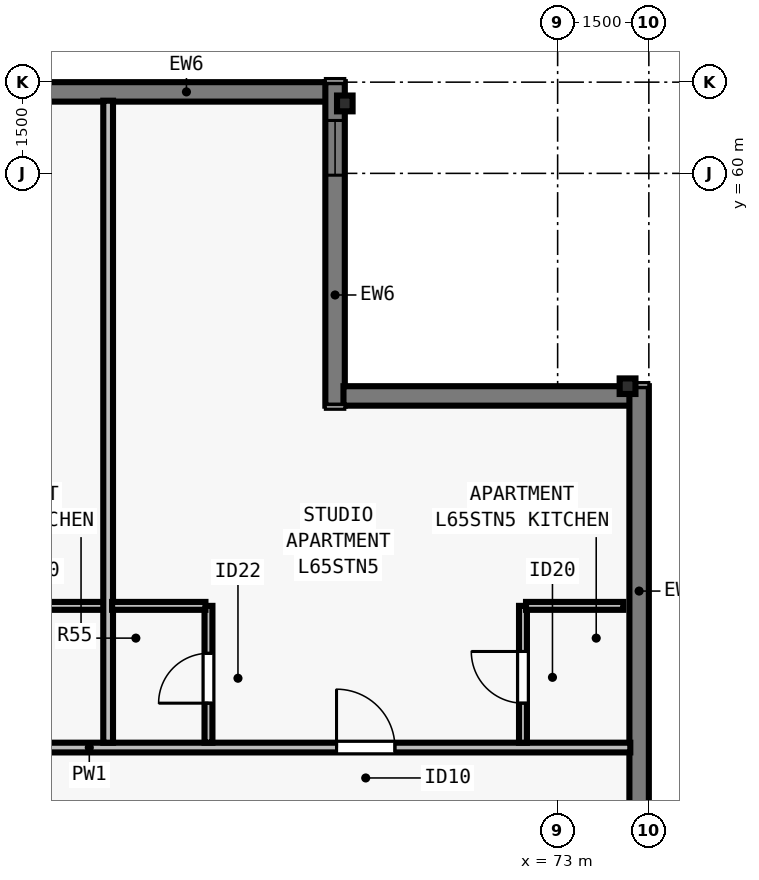
"""IFC4 building model, lengths in metres.
Left out: names, types, materials, properties, quantities, classifications, styles, units other than length and angle.
Written with IfcOpenShell. Run it as: python <this file> out.ifc"""

import sys

from ifc_helpers import new_model, si_unit, direction, frame, frame_2d, origin, origin_2d, place, context, subcontext, project, spatial, rectangle, i_section, extrude, element, fill, save


model = new_model("IFC4")
c1 = context("Model", 3, precision=1e-05, world=origin(), true_north=direction((0.0, 1.0)))
c2 = subcontext(c1, "Body", "Model", "MODEL_VIEW")
j1 = project(units=[si_unit("LENGTHUNIT", "METRE"), si_unit("PLANEANGLEUNIT", "RADIAN")], contexts=[c1])
p1 = place(None, origin())
s1 = spatial("IfcSite", under=j1, at=p1, CompositionType="ELEMENT")
p2 = place(p1, origin())
s2 = spatial("IfcBuilding", under=s1, at=p2, CompositionType="ELEMENT")
p3 = place(p2, frame((0.0, 0.0, 237.5)))
s3 = spatial("IfcBuildingStorey", under=s2, at=p3, CompositionType="ELEMENT", Elevation=237.5)
for number, where, z_axis, x_axis in (
    (1, (74.15, 56.5, 0.0), (0.0, 0.0, 1.0), (0.0, 1.0, 0.0)),
    (2, (69.5, 61.15, 0.0), (0.0, 0.0, 1.0), (1.0, 0.0, 0.0)),
):
    element("IfcColumn", number, at=place(p3, frame(where, z_axis=z_axis, x_axis=x_axis)), inside=s3, PredefinedType="COLUMN", context=c2, shape_type="SweptSolid", body=[
        extrude(i_section(OverallWidth=0.256, OverallDepth=0.26, WebThickness=0.01, FlangeThickness=0.017, FilletRadius=0.013, at=origin_2d()), origin(), (0.0, 0.0, 1.0), 3.5),
    ])
p4 = place(p3, frame((34.5, 61.34, 0.0), z_axis=(0.0, 0.0, 1.0), x_axis=(1.0, 0.0, 0.0)))
e3 = element("IfcWall", 3, at=p4, inside=s3, PredefinedType="SOLIDWALL", context=c2, shape_type="SweptSolid", body=[
    extrude(rectangle(XDim=34.702, YDim=0.32, at=frame_2d((17.351, 0.0))), origin(), (0.0, 0.0, 1.0), 3.29),
])
p5 = place(p4, frame((4.613, 0.0, 0.8)))
e4 = element("IfcOpeningElement", 4, at=p5, cuts=e3, PredefinedType="OPENING", context=c2, shape_type="SweptSolid", body=[
    extrude(rectangle(XDim=1.85, YDim=1.678, at=frame_2d((0.925, 0.839))), frame((0.0, 0.17, 0.0), z_axis=(0.0, -1.0, 0.0), x_axis=(1.0, 0.0, 0.0)), (0.0, 0.0, 1.0), 0.34),
])
p6 = place(p4, frame((8.138, 0.0, 0.8)))
e5 = element("IfcOpeningElement", 5, at=p6, cuts=e3, PredefinedType="OPENING", context=c2, shape_type="SweptSolid", body=[
    extrude(rectangle(XDim=1.55, YDim=1.678, at=frame_2d((0.775, 0.839))), frame((0.0, 0.17, 0.0), z_axis=(0.0, -1.0, 0.0), x_axis=(1.0, 0.0, 0.0)), (0.0, 0.0, 1.0), 0.34),
])
p7 = place(p4, frame((10.113, 0.0, 0.8)))
e6 = element("IfcOpeningElement", 6, at=p7, cuts=e3, PredefinedType="OPENING", context=c2, shape_type="SweptSolid", body=[
    extrude(rectangle(XDim=1.85, YDim=1.678, at=frame_2d((0.925, 0.839))), frame((0.0, 0.17, 0.0), z_axis=(0.0, -1.0, 0.0), x_axis=(1.0, 0.0, 0.0)), (0.0, 0.0, 1.0), 0.34),
])
p8 = place(p4, frame((14.888, 0.0, 0.8)))
e7 = element("IfcOpeningElement", 7, at=p8, cuts=e3, PredefinedType="OPENING", context=c2, shape_type="SweptSolid", body=[
    extrude(rectangle(XDim=1.55, YDim=1.678, at=frame_2d((0.775, 0.839))), frame((0.0, 0.17, 0.0), z_axis=(0.0, -1.0, 0.0), x_axis=(1.0, 0.0, 0.0)), (0.0, 0.0, 1.0), 0.34),
])
p9 = place(p4, frame((18.114, 0.0, 0.8)))
e8 = element("IfcOpeningElement", 8, at=p9, cuts=e3, PredefinedType="OPENING", context=c2, shape_type="SweptSolid", body=[
    extrude(rectangle(XDim=1.85, YDim=1.678, at=frame_2d((0.925, 0.839))), frame((0.0, 0.17, 0.0), z_axis=(0.0, -1.0, 0.0), x_axis=(1.0, 0.0, 0.0)), (0.0, 0.0, 1.0), 0.34),
])
p10 = place(p4, frame((24.864, 0.0, 0.8)))
e9 = element("IfcOpeningElement", 9, at=p10, cuts=e3, PredefinedType="OPENING", context=c2, shape_type="SweptSolid", body=[
    extrude(rectangle(XDim=1.85, YDim=1.678, at=frame_2d((0.925, 0.839))), frame((0.0, 0.17, 0.0), z_axis=(0.0, -1.0, 0.0), x_axis=(1.0, 0.0, 0.0)), (0.0, 0.0, 1.0), 0.34),
])
p11 = place(p4, frame((28.389, 0.0, 0.8)))
e10 = element("IfcOpeningElement", 10, at=p11, cuts=e3, PredefinedType="OPENING", context=c2, shape_type="SweptSolid", body=[
    extrude(rectangle(XDim=1.55, YDim=1.678, at=frame_2d((0.775, 0.839))), frame((0.0, 0.17, 0.0), z_axis=(0.0, -1.0, 0.0), x_axis=(1.0, 0.0, 0.0)), (0.0, 0.0, 1.0), 0.34),
])
p12 = place(p3, frame((69.34, 61.5, 0.0), z_axis=(0.0, 0.0, 1.0), x_axis=(0.0, -1.0, 0.0)))
e11 = element("IfcWall", 11, at=p12, inside=s3, PredefinedType="SOLIDWALL", context=c2, shape_type="SweptSolid", body=[
    extrude(rectangle(XDim=5.32, YDim=0.32, at=frame_2d((2.66, 0.0))), origin(), (0.0, 0.0, 1.0), 3.29),
])
p13 = place(p12, frame((0.63, 0.0, 0.8)))
e12 = element("IfcOpeningElement", 12, at=p13, cuts=e11, PredefinedType="OPENING", context=c2, shape_type="SweptSolid", body=[
    extrude(rectangle(XDim=0.9, YDim=1.678, at=frame_2d((0.45, 0.839))), frame((0.0, 0.17, 0.0), z_axis=(0.0, -1.0, 0.0), x_axis=(1.0, 0.0, 0.0)), (0.0, 0.0, 1.0), 0.34),
])
p14 = place(p3, frame((69.478, 56.34, 0.0), z_axis=(0.0, 0.0, 1.0), x_axis=(1.0, 0.0, 0.0)))
e13 = element("IfcWall", 13, at=p14, inside=s3, PredefinedType="SOLIDWALL", context=c2, shape_type="SweptSolid", body=[
    extrude(rectangle(XDim=4.724, YDim=0.32, at=frame_2d((2.362, 0.0))), origin(), (0.0, 0.0, 1.0), 3.29),
])
p15 = place(p3, frame((74.34, 56.5, 0.0), z_axis=(0.0, 0.0, 1.0), x_axis=(0.0, -1.0, 0.0)))
e14 = element("IfcWall", 14, at=p15, inside=s3, PredefinedType="SOLIDWALL", context=c2, shape_type="SweptSolid", body=[
    extrude(rectangle(XDim=34.702, YDim=0.32, at=frame_2d((17.351, 0.0))), origin(), (0.0, 0.0, 1.0), 3.29),
])
p16 = place(p15, frame((6.888, 0.0, 0.8)))
e15 = element("IfcOpeningElement", 15, at=p16, cuts=e14, PredefinedType="OPENING", context=c2, shape_type="SweptSolid", body=[
    extrude(rectangle(XDim=1.55, YDim=1.678, at=frame_2d((0.775, 0.839))), frame((0.0, 0.17, 0.0), z_axis=(0.0, -1.0, 0.0), x_axis=(1.0, 0.0, 0.0)), (0.0, 0.0, 1.0), 0.34),
])
p17 = place(p15, frame((10.113, 0.0, 0.8)))
e16 = element("IfcOpeningElement", 16, at=p17, cuts=e14, PredefinedType="OPENING", context=c2, shape_type="SweptSolid", body=[
    extrude(rectangle(XDim=1.85, YDim=1.678, at=frame_2d((0.925, 0.839))), frame((0.0, 0.17, 0.0), z_axis=(0.0, -1.0, 0.0), x_axis=(1.0, 0.0, 0.0)), (0.0, 0.0, 1.0), 0.34),
])
p18 = place(p15, frame((14.888, 0.0, 0.8)))
e17 = element("IfcOpeningElement", 17, at=p18, cuts=e14, PredefinedType="OPENING", context=c2, shape_type="SweptSolid", body=[
    extrude(rectangle(XDim=1.55, YDim=1.678, at=frame_2d((0.775, 0.839))), frame((0.0, 0.17, 0.0), z_axis=(0.0, -1.0, 0.0), x_axis=(1.0, 0.0, 0.0)), (0.0, 0.0, 1.0), 0.34),
])
p19 = place(p15, frame((18.114, 0.0, 0.8)))
e18 = element("IfcOpeningElement", 18, at=p19, cuts=e14, PredefinedType="OPENING", context=c2, shape_type="SweptSolid", body=[
    extrude(rectangle(XDim=1.85, YDim=1.678, at=frame_2d((0.925, 0.839))), frame((0.0, 0.17, 0.0), z_axis=(0.0, -1.0, 0.0), x_axis=(1.0, 0.0, 0.0)), (0.0, 0.0, 1.0), 0.34),
])
p20 = place(p15, frame((23.614, 0.0, 0.8)))
e19 = element("IfcOpeningElement", 19, at=p20, cuts=e14, PredefinedType="OPENING", context=c2, shape_type="SweptSolid", body=[
    extrude(rectangle(XDim=1.85, YDim=1.678, at=frame_2d((0.925, 0.839))), frame((0.0, 0.17, 0.0), z_axis=(0.0, -1.0, 0.0), x_axis=(1.0, 0.0, 0.0)), (0.0, 0.0, 1.0), 0.34),
])
p21 = place(p15, frame((27.139, 0.0, 0.8)))
e20 = element("IfcOpeningElement", 20, at=p21, cuts=e14, PredefinedType="OPENING", context=c2, shape_type="SweptSolid", body=[
    extrude(rectangle(XDim=1.55, YDim=1.678, at=frame_2d((0.775, 0.839))), frame((0.0, 0.17, 0.0), z_axis=(0.0, -1.0, 0.0), x_axis=(1.0, 0.0, 0.0)), (0.0, 0.0, 1.0), 0.34),
])
p22 = place(p3, frame((29.805, 50.558, 0.0), z_axis=(0.0, 0.0, 1.0), x_axis=(1.0, 0.0, 0.0)))
e21 = element("IfcWall", 21, at=p22, inside=s3, PredefinedType="PARTITIONING", context=c2, shape_type="SweptSolid", body=[
    extrude(rectangle(XDim=44.39, YDim=0.16, at=frame_2d((22.195, 0.0))), origin(), (0.0, 0.0, 1.0), 2.958),
])
p23 = place(p22, frame((3.791, 0.0, 0.0)))
e22 = element("IfcOpeningElement", 22, at=p23, cuts=e21, PredefinedType="OPENING", context=c2, shape_type="SweptSolid", body=[
    extrude(rectangle(XDim=0.96, YDim=2.18, at=frame_2d((0.48, 1.09))), frame((0.0, 0.09, 0.0), z_axis=(0.0, -1.0, 0.0), x_axis=(1.0, 0.0, 0.0)), (0.0, 0.0, 1.0), 0.18),
])
p24 = place(p22, frame((12.803, 0.0, 0.0)))
e23 = element("IfcOpeningElement", 23, at=p24, cuts=e21, PredefinedType="OPENING", context=c2, shape_type="SweptSolid", body=[
    extrude(rectangle(XDim=0.96, YDim=2.18, at=frame_2d((0.48, 1.09))), frame((0.0, 0.09, 0.0), z_axis=(0.0, -1.0, 0.0), x_axis=(1.0, 0.0, 0.0)), (0.0, 0.0, 1.0), 0.18),
])
p25 = place(p22, frame((21.635, 0.0, 0.0)))
e24 = element("IfcOpeningElement", 24, at=p25, cuts=e21, PredefinedType="OPENING", context=c2, shape_type="SweptSolid", body=[
    extrude(rectangle(XDim=0.96, YDim=2.18, at=frame_2d((0.48, 1.09))), frame((0.0, 0.09, 0.0), z_axis=(0.0, -1.0, 0.0), x_axis=(1.0, 0.0, 0.0)), (0.0, 0.0, 1.0), 0.18),
])
p26 = place(p22, frame((30.467, 0.0, 0.0)))
e25 = element("IfcOpeningElement", 25, at=p26, cuts=e21, PredefinedType="OPENING", context=c2, shape_type="SweptSolid", body=[
    extrude(rectangle(XDim=0.96, YDim=2.18, at=frame_2d((0.48, 1.09))), frame((0.0, 0.09, 0.0), z_axis=(0.0, -1.0, 0.0), x_axis=(1.0, 0.0, 0.0)), (0.0, 0.0, 1.0), 0.18),
])
p27 = place(p22, frame((39.559, 0.0, 0.0)))
e26 = element("IfcOpeningElement", 26, at=p27, cuts=e21, PredefinedType="OPENING", context=c2, shape_type="SweptSolid", body=[
    extrude(rectangle(XDim=0.96, YDim=2.18, at=frame_2d((0.48, 1.09))), frame((0.0, 0.09, 0.0), z_axis=(0.0, -1.0, 0.0), x_axis=(1.0, 0.0, 0.0)), (0.0, 0.0, 1.0), 0.18),
])
p28 = place(p3, frame((64.008, 52.887, 0.0), z_axis=(0.0, 0.0, 1.0), x_axis=(1.0, 0.0, 0.0)))
e27 = element("IfcWall", 27, at=p28, inside=s3, PredefinedType="PLUMBINGWALL", context=c2, shape_type="SweptSolid", body=[
    extrude(rectangle(XDim=1.6, YDim=0.13, at=frame_2d((0.8, 0.0))), origin(), (0.0, 0.0, 1.0), 3.29),
])
p29 = place(p3, frame((65.608, 50.637, 0.0), z_axis=(0.0, 0.0, 1.0), x_axis=(0.0, 1.0, 0.0)))
e28 = element("IfcWall", 28, at=p29, inside=s3, PredefinedType="PARTITIONING", context=c2, shape_type="SweptSolid", body=[
    extrude(rectangle(XDim=10.558, YDim=0.16, at=frame_2d((5.279, 0.0))), origin(), (0.0, 0.0, 1.0), 2.573),
])
p30 = place(p3, frame((67.258, 50.637, 0.0), z_axis=(0.0, 0.0, 1.0), x_axis=(0.0, 1.0, 0.0)))
e29 = element("IfcWall", 29, at=p30, inside=s3, PredefinedType="PLUMBINGWALL", context=c2, shape_type="SweptSolid", body=[
    extrude(rectangle(XDim=2.25, YDim=0.13, at=frame_2d((1.125, 0.0))), origin(), (0.0, 0.0, 1.0), 3.29),
])
p31 = place(p30, frame((0.65, 0.0, 0.0)))
e30 = element("IfcOpeningElement", 30, at=p31, cuts=e29, PredefinedType="OPENING", context=c2, shape_type="SweptSolid", body=[
    extrude(rectangle(XDim=0.82, YDim=2.1, at=frame_2d((0.41, 1.05))), frame((0.0, 0.075, 0.0), z_axis=(0.0, -1.0, 0.0), x_axis=(1.0, 0.0, 0.0)), (0.0, 0.0, 1.0), 0.15),
])
p32 = place(p3, frame((65.673, 52.887, 0.0), z_axis=(0.0, 0.0, 1.0), x_axis=(1.0, 0.0, 0.0)))
e31 = element("IfcWall", 31, at=p32, inside=s3, PredefinedType="PLUMBINGWALL", context=c2, shape_type="SweptSolid", body=[
    extrude(rectangle(XDim=1.535, YDim=0.13, at=frame_2d((0.768, 0.0))), origin(), (0.0, 0.0, 1.0), 3.29),
])
p33 = place(p3, frame((72.43, 50.637, 0.0), z_axis=(0.0, 0.0, 1.0), x_axis=(0.0, 1.0, 0.0)))
e32 = element("IfcWall", 32, at=p33, inside=s3, PredefinedType="PLUMBINGWALL", context=c2, shape_type="SweptSolid", body=[
    extrude(rectangle(XDim=2.25, YDim=0.13, at=frame_2d((1.125, 0.0))), origin(), (0.0, 0.0, 1.0), 3.29),
])
p34 = place(p33, frame((0.65, 0.0, 0.0)))
e33 = element("IfcOpeningElement", 33, at=p34, cuts=e32, PredefinedType="OPENING", context=c2, shape_type="SweptSolid", body=[
    extrude(rectangle(XDim=0.85, YDim=2.1, at=frame_2d((0.425, 1.05))), frame((0.0, 0.075, 0.0), z_axis=(0.0, -1.0, 0.0), x_axis=(1.0, 0.0, 0.0)), (0.0, 0.0, 1.0), 0.15),
])
p35 = place(p3, frame((72.48, 52.887, 0.0), z_axis=(0.0, 0.0, 1.0), x_axis=(1.0, 0.0, 0.0)))
e34 = element("IfcWall", 34, at=p35, inside=s3, PredefinedType="PLUMBINGWALL", context=c2, shape_type="SweptSolid", body=[
    extrude(rectangle(XDim=1.6, YDim=0.13, at=frame_2d((0.8, 0.0))), origin(), (0.0, 0.0, 1.0), 3.29),
])
p36 = place(p13, origin())
e35 = element("IfcWindow", 35, at=p36, inside=s3, PartitioningType="SINGLE_PANEL", PredefinedType="WINDOW", context=c2, shape_type="SweptSolid", body=[
    extrude(rectangle(XDim=0.9, YDim=1.678, at=frame_2d((0.45, 0.839))), frame((0.0, -0.04, 0.0), z_axis=(0.0, -1.0, 0.0), x_axis=(1.0, 0.0, 0.0)), (0.0, 0.0, 1.0), 0.06),
])
fill(e12, e35)
p37 = place(p31, origin())
e36 = element("IfcDoor", 36, at=p37, inside=s3, OperationType="SINGLE_SWING_LEFT", PredefinedType="DOOR", context=c2, shape_type="SweptSolid", body=[
    extrude(rectangle(XDim=0.82, YDim=2.1, at=frame_2d((0.41, 1.05))), frame((0.0, 0.025, 0.0), z_axis=(0.0, -1.0, 0.0), x_axis=(1.0, 0.0, 0.0)), (0.0, 0.0, 1.0), 0.05),
])
fill(e30, e36)
p38 = place(p34, origin())
e37 = element("IfcDoor", 37, at=p38, inside=s3, OperationType="SINGLE_SWING_RIGHT", PredefinedType="DOOR", context=c2, shape_type="SweptSolid", body=[
    extrude(rectangle(XDim=0.85, YDim=2.1, at=frame_2d((0.425, 1.05))), frame((0.0, 0.025, 0.0), z_axis=(0.0, -1.0, 0.0), x_axis=(1.0, 0.0, 0.0)), (0.0, 0.0, 1.0), 0.05),
])
fill(e33, e37)
p39 = place(p27, origin())
e38 = element("IfcDoor", 38, at=p39, inside=s3, OperationType="SINGLE_SWING_LEFT", PredefinedType="DOOR", context=c2, shape_type="SweptSolid", body=[
    extrude(rectangle(XDim=0.96, YDim=2.18, at=frame_2d((0.48, 1.09))), frame((0.0, 0.025, 0.0), z_axis=(0.0, -1.0, 0.0), x_axis=(1.0, 0.0, 0.0)), (0.0, 0.0, 1.0), 0.05),
])
fill(e26, e38)
save(model, sys.argv[1])
